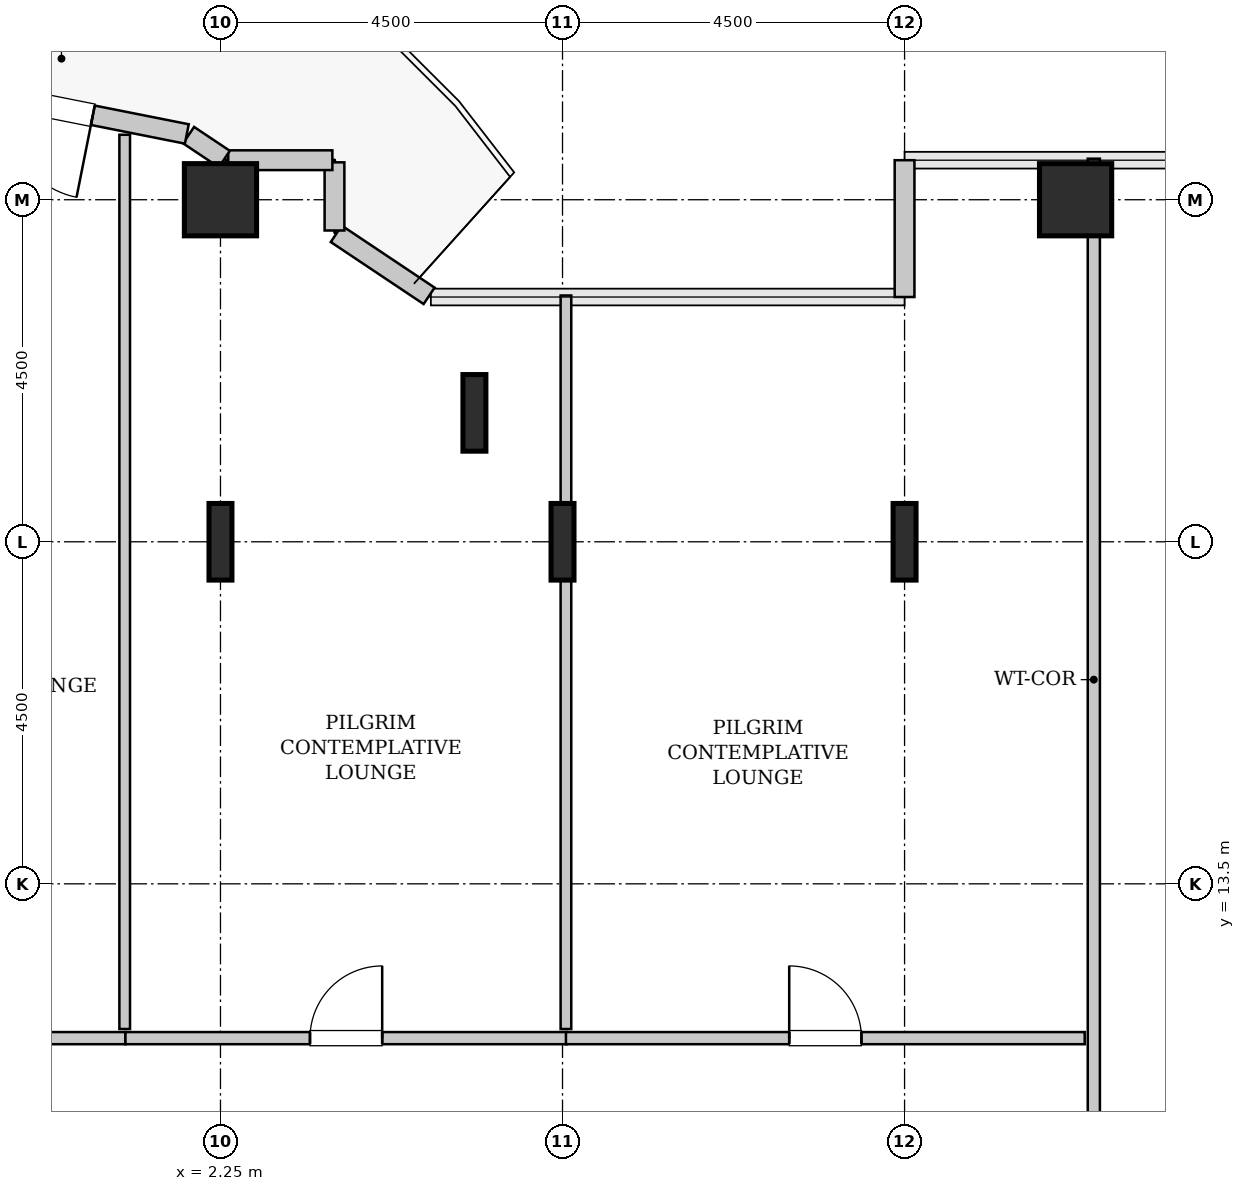
"""IFC4 building model, lengths in metres.
Left out: names, types, materials, properties, quantities, classifications, styles, units other than length and angle.
Written with IfcOpenShell. Run it as: python <this file> out.ifc"""

import sys

from ifc_helpers import new_model, si_unit, direction, frame, frame_2d, origin, origin_2d, place, context, subcontext, project, spatial, rectangle, hollow_rectangle, i_section, extrude, source, transform, mapped, element, fill, save


model = new_model("IFC4")
c1 = context("Model", 3, precision=1e-05, world=origin(), true_north=direction((0.0, 1.0)))
c2 = subcontext(c1, "Body", "Model", "MODEL_VIEW")
j1 = project(units=[si_unit("LENGTHUNIT", "METRE"), si_unit("PLANEANGLEUNIT", "RADIAN")], contexts=[c1])
p1 = place(None, origin())
s1 = spatial("IfcSite", under=j1, at=p1, CompositionType="ELEMENT")
p2 = place(p1, origin())
s2 = spatial("IfcBuilding", under=s1, at=p2, CompositionType="ELEMENT")
p3 = place(p2, frame((0.0, 0.0, 44.4)))
s3 = spatial("IfcBuildingStorey", under=s2, at=p3, CompositionType="ELEMENT", Elevation=44.4)
m1 = source(origin(), c2, "Body", "SweptSolid", [
    extrude(i_section(OverallWidth=0.302, OverallDepth=1.008, WebThickness=0.021, FlangeThickness=0.04, FilletRadius=0.03, at=origin_2d()), origin(), (0.0, 0.0, 1.0), 3.8),
])
p4 = place(p3, frame((2.25, 18.0, 0.0), z_axis=(0.0, 0.0, 1.0), x_axis=(1.0, 0.0, 0.0)))
e1 = element("IfcColumn", 1, at=p4, inside=s3, PredefinedType="COLUMN", context=c2, shape_type="MappedRepresentation", body=[
    mapped(m1, transform((0.0, 0.0, 0.0), x_axis=(1.0, 0.0, 0.0), y_axis=(0.0, 1.0, 0.0), z_axis=(0.0, 0.0, 1.0), scale=1.0)),
])
m2 = source(origin(), c2, "Body", "SweptSolid", [
    extrude(hollow_rectangle(XDim=0.95, YDim=0.95, WallThickness=0.045, InnerFilletRadius=0.045, OuterFilletRadius=0.09, at=origin_2d()), origin(), (0.0, 0.0, 1.0), 3.8),
])
p5 = place(p3, frame((2.25, 22.5, 0.0), z_axis=(0.0, 0.0, 1.0), x_axis=(1.0, 0.0, 0.0)))
e2 = element("IfcColumn", 2, at=p5, inside=s3, PredefinedType="COLUMN", context=c2, shape_type="MappedRepresentation", body=[
    mapped(m2, transform((0.0, 0.0, 0.0), x_axis=(1.0, 0.0, 0.0), y_axis=(0.0, 1.0, 0.0), z_axis=(0.0, 0.0, 1.0), scale=1.0)),
])
for number, where, z_axis, x_axis in (
    (3, (5.591, 19.696, 0.0), (0.0, 0.0, 1.0), (1.0, 0.0, 0.0)),
    (4, (6.75, 18.0, 0.0), (0.0, 0.0, 1.0), (1.0, 0.0, 0.0)),
    (5, (11.25, 18.0, 0.0), (0.0, 0.0, 1.0), (1.0, 0.0, 0.0)),
):
    element("IfcColumn", number, at=place(p3, frame(where, z_axis=z_axis, x_axis=x_axis)), inside=s3, PredefinedType="COLUMN", context=c2, shape_type="MappedRepresentation", body=[
        mapped(m1, transform((0.0, 0.0, 0.0), x_axis=(1.0, 0.0, 0.0), y_axis=(0.0, 1.0, 0.0), z_axis=(0.0, 0.0, 1.0), scale=1.0)),
    ])
p6 = place(p3, frame((13.5, 22.5, 0.0), z_axis=(0.0, 0.0, 1.0), x_axis=(1.0, 0.0, 0.0)))
e6 = element("IfcColumn", 6, at=p6, inside=s3, PredefinedType="COLUMN", context=c2, shape_type="MappedRepresentation", body=[
    mapped(m2, transform((0.0, 0.0, 0.0), x_axis=(1.0, 0.0, 0.0), y_axis=(0.0, 1.0, 0.0), z_axis=(0.0, 0.0, 1.0), scale=1.0)),
])
m3 = source(origin(), c2, "Body", "SweptSolid", [
    extrude(rectangle(XDim=1.8, YDim=0.26, at=frame_2d((0.9, 0.0))), origin(), (0.0, 0.0, 1.0), 3.55),
])
p7 = place(p3, frame((11.25, 23.02, 0.0), z_axis=(0.0, 0.0, 1.0), x_axis=(0.0, -1.0, 0.0)))
e7 = element("IfcWall", 7, at=p7, inside=s3, PredefinedType="SOLIDWALL", context=c2, shape_type="MappedRepresentation", body=[
    mapped(m3, transform((0.0, 0.0, 0.0), x_axis=(1.0, 0.0, 0.0), y_axis=(0.0, 1.0, 0.0), z_axis=(0.0, 0.0, 1.0), scale=1.0)),
])
m4 = source(origin(), c2, "Body", "SweptSolid", [
    extrude(rectangle(XDim=1.469, YDim=0.26, at=frame_2d((0.734, 0.0))), origin(), (0.0, 0.0, 1.0), 3.55),
])
p8 = place(p3, frame((4.995, 21.236, 0.0), z_axis=(0.0, 0.0, 1.0), x_axis=(-0.831461760506, 0.555581983884, 0.0)))
e8 = element("IfcWall", 8, at=p8, inside=s3, PredefinedType="SOLIDWALL", context=c2, shape_type="MappedRepresentation", body=[
    mapped(m4, transform((0.0, 0.0, 0.0), x_axis=(1.0, 0.0, 0.0), y_axis=(0.0, 1.0, 0.0), z_axis=(0.0, 0.0, 1.0), scale=1.0)),
])
m5 = source(origin(), c2, "Body", "SweptSolid", [
    extrude(rectangle(XDim=0.897, YDim=0.26, at=frame_2d((0.448, 0.0))), origin(), (0.0, 0.0, 1.0), 3.55),
])
p9 = place(p3, frame((3.75, 22.095, 0.0), z_axis=(0.0, 0.0, 1.0), x_axis=(0.0, 1.0, 0.0)))
e9 = element("IfcWall", 9, at=p9, inside=s3, PredefinedType="SOLIDWALL", context=c2, shape_type="MappedRepresentation", body=[
    mapped(m5, transform((0.0, 0.0, 0.0), x_axis=(1.0, 0.0, 0.0), y_axis=(0.0, 1.0, 0.0), z_axis=(0.0, 0.0, 1.0), scale=1.0)),
])
m6 = source(origin(), c2, "Body", "SweptSolid", [
    extrude(rectangle(XDim=1.37, YDim=0.26, at=frame_2d((0.685, 0.0))), origin(), (0.0, 0.0, 1.0), 3.55),
])
p10 = place(p3, frame((3.722, 23.02, 0.0), z_axis=(0.0, 0.0, 1.0), x_axis=(-1.0, 0.0, 0.0)))
e10 = element("IfcWall", 10, at=p10, inside=s3, PredefinedType="SOLIDWALL", context=c2, shape_type="MappedRepresentation", body=[
    mapped(m6, transform((0.0, 0.0, 0.0), x_axis=(1.0, 0.0, 0.0), y_axis=(0.0, 1.0, 0.0), z_axis=(0.0, 0.0, 1.0), scale=1.0)),
])
m7 = source(origin(), c2, "Body", "SweptSolid", [
    extrude(rectangle(XDim=0.565, YDim=0.26, at=frame_2d((0.283, 0.0))), origin(), (0.0, 0.0, 1.0), 3.55),
])
p11 = place(p3, frame((2.301, 23.036, 0.0), z_axis=(0.0, 0.0, 1.0), x_axis=(-0.831651492666, 0.555297933317, 0.0)))
e11 = element("IfcWall", 11, at=p11, inside=s3, PredefinedType="SOLIDWALL", context=c2, shape_type="MappedRepresentation", body=[
    mapped(m7, transform((0.0, 0.0, 0.0), x_axis=(1.0, 0.0, 0.0), y_axis=(0.0, 1.0, 0.0), z_axis=(0.0, 0.0, 1.0), scale=1.0)),
])
m8 = source(origin(), c2, "Body", "SweptSolid", [
    extrude(rectangle(XDim=4.137, YDim=0.26, at=frame_2d((2.068, 0.0))), origin(), (0.0, 0.0, 1.0), 3.55),
])
p12 = place(p3, frame((1.807, 23.365, 0.0), z_axis=(0.0, 0.0, 1.0), x_axis=(-0.980782170794, 0.195105954428, 0.0)))
e12 = element("IfcWall", 12, at=p12, inside=s3, PredefinedType="SOLIDWALL", context=c2, shape_type="MappedRepresentation", body=[
    mapped(m8, transform((0.0, 0.0, 0.0), x_axis=(1.0, 0.0, 0.0), y_axis=(0.0, 1.0, 0.0), z_axis=(0.0, 0.0, 1.0), scale=1.0)),
])
p13 = place(p12, frame((1.261, 0.0, 0.0)))
e13 = element("IfcOpeningElement", 13, at=p13, cuts=e12, PredefinedType="OPENING", context=c2, shape_type="SweptSolid", body=[
    extrude(rectangle(XDim=1.1, YDim=2.2, at=frame_2d((0.55, 1.1))), frame((0.0, 0.14, 0.0), z_axis=(0.0, -1.0, 0.0), x_axis=(1.0, 0.0, 0.0)), (0.0, 0.0, 1.0), 0.28),
])
m9 = source(origin(), c2, "Body", "SweptSolid", [
    extrude(rectangle(XDim=16.735, YDim=0.16, at=frame_2d((8.368, 0.0))), origin(), (0.0, 0.0, 1.0), 3.535),
])
p14 = place(p3, frame((13.74, 6.305, 0.0), z_axis=(0.0, 0.0, 1.0), x_axis=(0.0, 1.0, 0.0)))
e14 = element("IfcWall", 14, at=p14, inside=s3, PredefinedType="PARTITIONING", context=c2, shape_type="MappedRepresentation", body=[
    mapped(m9, transform((0.0, 0.0, 0.0), x_axis=(1.0, 0.0, 0.0), y_axis=(0.0, 1.0, 0.0), z_axis=(0.0, 0.0, 1.0), scale=1.0)),
])
p15 = place(p14, frame((2.127, 0.0, 0.0)))
e15 = element("IfcOpeningElement", 15, at=p15, cuts=e14, PredefinedType="OPENING", context=c2, shape_type="SweptSolid", body=[
    extrude(rectangle(XDim=0.95, YDim=2.1, at=frame_2d((0.475, 1.05))), frame((0.0, 0.09, 0.0), z_axis=(0.0, -1.0, 0.0), x_axis=(1.0, 0.0, 0.0)), (0.0, 0.0, 1.0), 0.18),
])
m10 = source(origin(), c2, "Body", "SweptSolid", [
    extrude(rectangle(XDim=5.805, YDim=0.16, at=frame_2d((2.902, 0.0))), origin(), (0.0, 0.0, 1.0), 3.535),
])
p16 = place(p3, frame((-4.805, 11.47, 0.0), z_axis=(0.0, 0.0, 1.0), x_axis=(1.0, 0.0, 0.0)))
e16 = element("IfcWall", 16, at=p16, inside=s3, PredefinedType="PARTITIONING", context=c2, shape_type="MappedRepresentation", body=[
    mapped(m10, transform((0.0, 0.0, 0.0), x_axis=(1.0, 0.0, 0.0), y_axis=(0.0, 1.0, 0.0), z_axis=(0.0, 0.0, 1.0), scale=1.0)),
])
p17 = place(p16, frame((2.427, 0.0, 0.0)))
e17 = element("IfcOpeningElement", 17, at=p17, cuts=e16, PredefinedType="OPENING", context=c2, shape_type="SweptSolid", body=[
    extrude(rectangle(XDim=0.95, YDim=2.1, at=frame_2d((0.475, 1.05))), frame((0.0, 0.09, 0.0), z_axis=(0.0, -1.0, 0.0), x_axis=(1.0, 0.0, 0.0)), (0.0, 0.0, 1.0), 0.18),
])
m11 = source(origin(), c2, "Body", "SweptSolid", [
    extrude(rectangle(XDim=11.765, YDim=0.14, at=frame_2d((5.882, 0.0))), origin(), (0.0, 0.0, 1.0), 3.535),
])
p18 = place(p3, frame((0.99, 11.59, 0.0), z_axis=(0.0, 0.0, 1.0), x_axis=(0.0, 1.0, 0.0)))
e18 = element("IfcWall", 18, at=p18, inside=s3, PredefinedType="PARTITIONING", context=c2, shape_type="MappedRepresentation", body=[
    mapped(m11, transform((0.0, 0.0, 0.0), x_axis=(1.0, 0.0, 0.0), y_axis=(0.0, 1.0, 0.0), z_axis=(0.0, 0.0, 1.0), scale=1.0)),
])
p19 = place(p3, frame((1.0, 11.47, 0.0), z_axis=(0.0, 0.0, 1.0), x_axis=(1.0, 0.0, 0.0)))
e19 = element("IfcWall", 19, at=p19, inside=s3, PredefinedType="PARTITIONING", context=c2, shape_type="MappedRepresentation", body=[
    mapped(m10, transform((0.0, 0.0, 0.0), x_axis=(1.0, 0.0, 0.0), y_axis=(0.0, 1.0, 0.0), z_axis=(0.0, 0.0, 1.0), scale=1.0)),
])
p20 = place(p19, frame((2.427, 0.0, 0.0)))
e20 = element("IfcOpeningElement", 20, at=p20, cuts=e19, PredefinedType="OPENING", context=c2, shape_type="SweptSolid", body=[
    extrude(rectangle(XDim=0.95, YDim=2.1, at=frame_2d((0.475, 1.05))), frame((0.0, 0.09, 0.0), z_axis=(0.0, -1.0, 0.0), x_axis=(1.0, 0.0, 0.0)), (0.0, 0.0, 1.0), 0.18),
])
m12 = source(origin(), c2, "Body", "SweptSolid", [
    extrude(rectangle(XDim=9.65, YDim=0.14, at=frame_2d((4.825, 0.0))), origin(), (0.0, 0.0, 1.0), 3.535),
])
p21 = place(p3, frame((6.795, 11.59, 0.0), z_axis=(0.0, 0.0, 1.0), x_axis=(0.0, 1.0, 0.0)))
e21 = element("IfcWall", 21, at=p21, inside=s3, PredefinedType="PARTITIONING", context=c2, shape_type="MappedRepresentation", body=[
    mapped(m12, transform((0.0, 0.0, 0.0), x_axis=(1.0, 0.0, 0.0), y_axis=(0.0, 1.0, 0.0), z_axis=(0.0, 0.0, 1.0), scale=1.0)),
])
m13 = source(origin(), c2, "Body", "SweptSolid", [
    extrude(rectangle(XDim=6.825, YDim=0.16, at=frame_2d((3.413, 0.0))), origin(), (0.0, 0.0, 1.0), 3.535),
])
p22 = place(p3, frame((6.795, 11.47, 0.0), z_axis=(0.0, 0.0, 1.0), x_axis=(1.0, 0.0, 0.0)))
e22 = element("IfcWall", 22, at=p22, inside=s3, PredefinedType="PARTITIONING", context=c2, shape_type="MappedRepresentation", body=[
    mapped(m13, transform((0.0, 0.0, 0.0), x_axis=(1.0, 0.0, 0.0), y_axis=(0.0, 1.0, 0.0), z_axis=(0.0, 0.0, 1.0), scale=1.0)),
])
p23 = place(p22, frame((2.938, 0.0, 0.0)))
e23 = element("IfcOpeningElement", 23, at=p23, cuts=e22, PredefinedType="OPENING", context=c2, shape_type="SweptSolid", body=[
    extrude(rectangle(XDim=0.95, YDim=2.1, at=frame_2d((0.475, 1.05))), frame((0.0, 0.09, 0.0), z_axis=(0.0, -1.0, 0.0), x_axis=(1.0, 0.0, 0.0)), (0.0, 0.0, 1.0), 0.18),
])
m14 = source(origin(), c2, "Body", "SweptSolid", [
    extrude(rectangle(XDim=1.1, YDim=2.2, at=frame_2d((0.55, 1.1))), frame((0.0, 0.025, 0.0), z_axis=(0.0, -1.0, 0.0), x_axis=(1.0, 0.0, 0.0)), (0.0, 0.0, 1.0), 0.05),
])
p24 = place(p13, origin())
e24 = element("IfcDoor", 24, at=p24, inside=s3, OperationType="SINGLE_SWING_LEFT", PredefinedType="DOOR", context=c2, shape_type="MappedRepresentation", body=[
    mapped(m14, transform((0.0, 0.0, 0.0), x_axis=(1.0, 0.0, 0.0), y_axis=(0.0, 1.0, 0.0), z_axis=(0.0, 0.0, 1.0), scale=1.0)),
])
fill(e13, e24)
m15 = source(origin(), c2, "Body", "SweptSolid", [
    extrude(rectangle(XDim=0.95, YDim=2.1, at=frame_2d((0.475, 1.05))), frame((0.0, 0.025, 0.0), z_axis=(0.0, -1.0, 0.0), x_axis=(1.0, 0.0, 0.0)), (0.0, 0.0, 1.0), 0.05),
])
p25 = place(p20, origin())
e25 = element("IfcDoor", 25, at=p25, inside=s3, OperationType="SINGLE_SWING_RIGHT", PredefinedType="DOOR", context=c2, shape_type="MappedRepresentation", body=[
    mapped(m15, transform((0.0, 0.0, 0.0), x_axis=(1.0, 0.0, 0.0), y_axis=(0.0, 1.0, 0.0), z_axis=(0.0, 0.0, 1.0), scale=1.0)),
])
fill(e20, e25)
p26 = place(p23, origin())
e26 = element("IfcDoor", 26, at=p26, inside=s3, OperationType="SINGLE_SWING_LEFT", PredefinedType="DOOR", context=c2, shape_type="MappedRepresentation", body=[
    mapped(m15, transform((0.0, 0.0, 0.0), x_axis=(1.0, 0.0, 0.0), y_axis=(0.0, 1.0, 0.0), z_axis=(0.0, 0.0, 1.0), scale=1.0)),
])
fill(e23, e26)
save(model, sys.argv[1])
